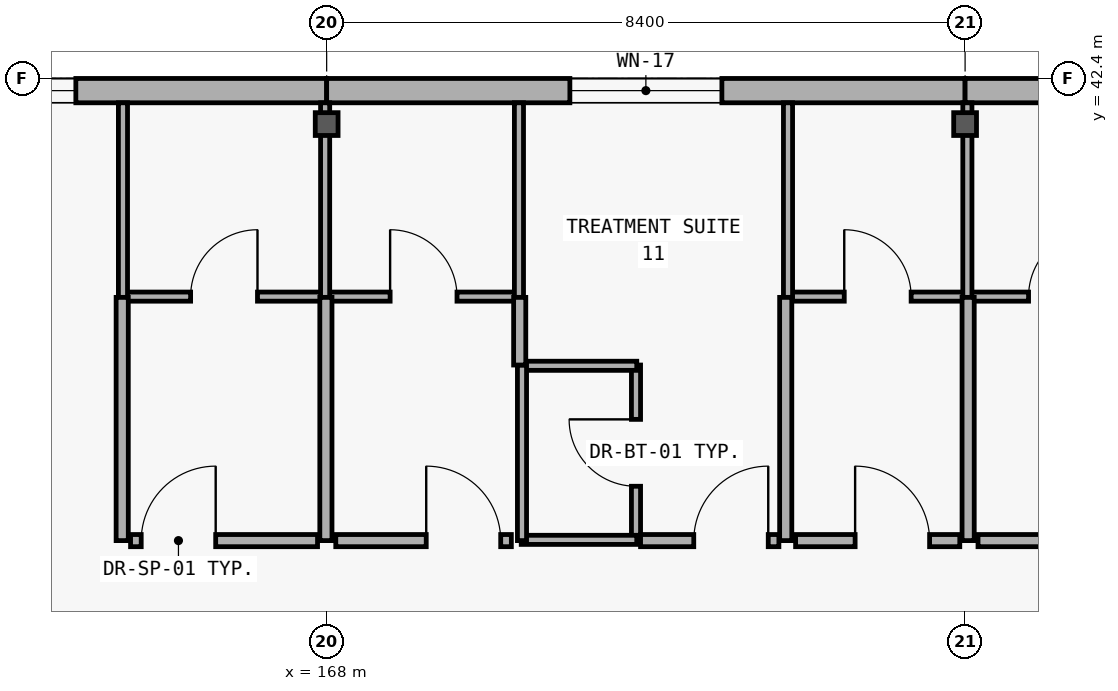
"""IFC4 building model, lengths in metres.
Left out: names, types, materials, properties, quantities, classifications, styles, units other than length and angle.
Written with IfcOpenShell. Run it as: python <this file> out.ifc"""

import sys

from ifc_helpers import new_model, si_unit, direction, frame, frame_2d, origin, origin_2d, place, context, subcontext, project, spatial, rectangle, i_section, extrude, element, fill, save


model = new_model("IFC4")
c1 = context("Model", 3, precision=1e-05, world=origin(), true_north=direction((0.0, 1.0)))
c2 = subcontext(c1, "Body", "Model", "MODEL_VIEW")
j1 = project(units=[si_unit("LENGTHUNIT", "METRE"), si_unit("PLANEANGLEUNIT", "RADIAN")], contexts=[c1])
p1 = place(None, origin())
s1 = spatial("IfcSite", under=j1, at=p1, CompositionType="ELEMENT")
p2 = place(p1, origin())
s2 = spatial("IfcBuilding", under=s1, at=p2, CompositionType="ELEMENT")
p3 = place(p2, frame((0.0, 0.0, 5.4)))
s3 = spatial("IfcBuildingStorey", under=s2, at=p3, CompositionType="ELEMENT", Elevation=5.4)
for number, where, z_axis, x_axis in (
    (1, (168.0, 41.8, 0.0), (0.0, 0.0, 1.0), (1.0, 0.0, 0.0)),
    (2, (176.4, 41.8, 0.0), (0.0, 0.0, 1.0), (1.0, 0.0, 0.0)),
):
    element("IfcColumn", number, at=place(p3, frame(where, z_axis=z_axis, x_axis=x_axis)), inside=s3, PredefinedType="COLUMN", context=c2, shape_type="SweptSolid", body=[
        extrude(i_section(OverallWidth=0.3, OverallDepth=0.3, WebThickness=0.011, FlangeThickness=0.019, at=origin_2d()), origin(), (0.0, 0.0, 1.0), 5.4),
    ])
p4 = place(p3, frame((159.6, 42.24, 0.0), z_axis=(0.0, 0.0, 1.0), x_axis=(1.0, 0.0, 0.0)))
e3 = element("IfcWall", 3, at=p4, inside=s3, PredefinedType="SOLIDWALL", context=c2, shape_type="SweptSolid", body=[
    extrude(rectangle(XDim=8.4, YDim=0.32, at=frame_2d((4.2, 0.0))), origin(), (0.0, 0.0, 1.0), 5.1),
])
p5 = place(p4, frame((3.3, 0.0, 0.9)))
e4 = element("IfcOpeningElement", 4, at=p5, cuts=e3, PredefinedType="OPENING", context=c2, shape_type="SweptSolid", body=[
    extrude(rectangle(XDim=1.8, YDim=1.6, at=frame_2d((0.9, 0.8))), frame((0.0, 0.17, 0.0), z_axis=(0.0, -1.0, 0.0), x_axis=(1.0, 0.0, 0.0)), (0.0, 0.0, 1.0), 0.34),
])
p6 = place(p3, frame((168.0, 42.24, 0.0), z_axis=(0.0, 0.0, 1.0), x_axis=(1.0, 0.0, 0.0)))
e5 = element("IfcWall", 5, at=p6, inside=s3, PredefinedType="SOLIDWALL", context=c2, shape_type="SweptSolid", body=[
    extrude(rectangle(XDim=8.4, YDim=0.32, at=frame_2d((4.2, 0.0))), origin(), (0.0, 0.0, 1.0), 5.1),
])
p7 = place(p6, frame((3.2, 0.0, 0.9)))
e6 = element("IfcOpeningElement", 6, at=p7, cuts=e5, PredefinedType="OPENING", context=c2, shape_type="SweptSolid", body=[
    extrude(rectangle(XDim=2.0, YDim=1.65, at=frame_2d((1.0, 0.825))), frame((0.0, 0.17, 0.0), z_axis=(0.0, -1.0, 0.0), x_axis=(1.0, 0.0, 0.0)), (0.0, 0.0, 1.0), 0.34),
])
p8 = place(p3, frame((176.4, 42.24, 0.0), z_axis=(0.0, 0.0, 1.0), x_axis=(1.0, 0.0, 0.0)))
e7 = element("IfcWall", 7, at=p8, inside=s3, PredefinedType="SOLIDWALL", context=c2, shape_type="SweptSolid", body=[
    extrude(rectangle(XDim=8.4, YDim=0.32, at=frame_2d((4.2, 0.0))), origin(), (0.0, 0.0, 1.0), 5.1),
])
p9 = place(p8, frame((3.1, 0.0, 0.9)))
e8 = element("IfcOpeningElement", 8, at=p9, cuts=e7, PredefinedType="OPENING", context=c2, shape_type="SweptSolid", body=[
    extrude(rectangle(XDim=2.2, YDim=1.65, at=frame_2d((1.1, 0.825))), frame((0.0, 0.17, 0.0), z_axis=(0.0, -1.0, 0.0), x_axis=(1.0, 0.0, 0.0)), (0.0, 0.0, 1.0), 0.34),
])
p10 = place(p3, frame((165.31, 39.53, 0.0), z_axis=(0.0, 0.0, 1.0), x_axis=(1.0, 0.0, 0.0)))
e9 = element("IfcWall", 9, at=p10, inside=s3, PredefinedType="PARTITIONING", context=c2, shape_type="SweptSolid", body=[
    extrude(rectangle(XDim=2.68, YDim=0.12, at=frame_2d((1.34, 0.0))), origin(), (0.0, 0.0, 1.0), 4.18),
])
p11 = place(p10, frame((0.9, 0.0, 0.0)))
e10 = element("IfcOpeningElement", 10, at=p11, cuts=e9, PredefinedType="OPENING", context=c2, shape_type="SweptSolid", body=[
    extrude(rectangle(XDim=0.88, YDim=2.15, at=frame_2d((0.44, 1.075))), frame((0.0, 0.07, 0.0), z_axis=(0.0, -1.0, 0.0), x_axis=(1.0, 0.0, 0.0)), (0.0, 0.0, 1.0), 0.14),
])
p12 = place(p3, frame((168.01, 39.53, 0.0), z_axis=(0.0, 0.0, 1.0), x_axis=(1.0, 0.0, 0.0)))
e11 = element("IfcWall", 11, at=p12, inside=s3, PredefinedType="PARTITIONING", context=c2, shape_type="SweptSolid", body=[
    extrude(rectangle(XDim=2.53, YDim=0.12, at=frame_2d((1.265, 0.0))), origin(), (0.0, 0.0, 1.0), 4.18),
])
p13 = place(p12, frame((0.825, 0.0, 0.0)))
e12 = element("IfcOpeningElement", 12, at=p13, cuts=e11, PredefinedType="OPENING", context=c2, shape_type="SweptSolid", body=[
    extrude(rectangle(XDim=0.88, YDim=2.15, at=frame_2d((0.44, 1.075))), frame((0.0, 0.07, 0.0), z_axis=(0.0, -1.0, 0.0), x_axis=(1.0, 0.0, 0.0)), (0.0, 0.0, 1.0), 0.14),
])
p14 = place(p3, frame((172.07, 36.32, 0.0), z_axis=(0.0, 0.0, 1.0), x_axis=(0.0, 1.0, 0.0)))
e13 = element("IfcWall", 13, at=p14, inside=s3, PredefinedType="PARTITIONING", context=c2, shape_type="SweptSolid", body=[
    extrude(rectangle(XDim=2.31, YDim=0.12, at=frame_2d((1.155, 0.0))), origin(), (0.0, 0.0, 1.0), 4.18),
])
p15 = place(p14, frame((0.715, 0.0, 0.0)))
e14 = element("IfcOpeningElement", 14, at=p15, cuts=e13, PredefinedType="OPENING", context=c2, shape_type="SweptSolid", body=[
    extrude(rectangle(XDim=0.88, YDim=2.15, at=frame_2d((0.44, 1.075))), frame((0.0, 0.07, 0.0), z_axis=(0.0, -1.0, 0.0), x_axis=(1.0, 0.0, 0.0)), (0.0, 0.0, 1.0), 0.14),
])
p16 = place(p3, frame((174.06, 39.53, 0.0), z_axis=(0.0, 0.0, 1.0), x_axis=(1.0, 0.0, 0.0)))
e15 = element("IfcWall", 15, at=p16, inside=s3, PredefinedType="PARTITIONING", context=c2, shape_type="SweptSolid", body=[
    extrude(rectangle(XDim=2.38, YDim=0.12, at=frame_2d((1.19, 0.0))), origin(), (0.0, 0.0, 1.0), 4.18),
])
p17 = place(p16, frame((0.75, 0.0, 0.0)))
e16 = element("IfcOpeningElement", 16, at=p17, cuts=e15, PredefinedType="OPENING", context=c2, shape_type="SweptSolid", body=[
    extrude(rectangle(XDim=0.88, YDim=2.15, at=frame_2d((0.44, 1.075))), frame((0.0, 0.07, 0.0), z_axis=(0.0, -1.0, 0.0), x_axis=(1.0, 0.0, 0.0)), (0.0, 0.0, 1.0), 0.14),
])
p18 = place(p3, frame((176.46, 39.53, 0.0), z_axis=(0.0, 0.0, 1.0), x_axis=(1.0, 0.0, 0.0)))
e17 = element("IfcWall", 17, at=p18, inside=s3, PredefinedType="PARTITIONING", context=c2, shape_type="SweptSolid", body=[
    extrude(rectangle(XDim=2.43, YDim=0.12, at=frame_2d((1.215, 0.0))), origin(), (0.0, 0.0, 1.0), 4.18),
])
p19 = place(p18, frame((0.775, 0.0, 0.0)))
e18 = element("IfcOpeningElement", 18, at=p19, cuts=e17, PredefinedType="OPENING", context=c2, shape_type="SweptSolid", body=[
    extrude(rectangle(XDim=0.88, YDim=2.15, at=frame_2d((0.44, 1.075))), frame((0.0, 0.07, 0.0), z_axis=(0.0, -1.0, 0.0), x_axis=(1.0, 0.0, 0.0)), (0.0, 0.0, 1.0), 0.14),
])
p20 = place(p3, frame((165.42, 36.32, 0.0), z_axis=(0.0, 0.0, 1.0), x_axis=(1.0, 0.0, 0.0)))
e19 = element("IfcWall", 19, at=p20, inside=s3, PredefinedType="PARTITIONING", context=c2, shape_type="SweptSolid", body=[
    extrude(rectangle(XDim=2.46, YDim=0.16, at=frame_2d((1.23, 0.0))), origin(), (0.0, 0.0, 1.0), 4.18),
])
p21 = place(p20, frame((0.14, 0.0, 0.0)))
e20 = element("IfcOpeningElement", 20, at=p21, cuts=e19, PredefinedType="OPENING", context=c2, shape_type="SweptSolid", body=[
    extrude(rectangle(XDim=0.98, YDim=2.2, at=frame_2d((0.49, 1.1))), frame((0.0, 0.09, 0.0), z_axis=(0.0, -1.0, 0.0), x_axis=(1.0, 0.0, 0.0)), (0.0, 0.0, 1.0), 0.18),
])
p22 = place(p3, frame((168.12, 36.32, 0.0), z_axis=(0.0, 0.0, 1.0), x_axis=(1.0, 0.0, 0.0)))
e21 = element("IfcWall", 21, at=p22, inside=s3, PredefinedType="PARTITIONING", context=c2, shape_type="SweptSolid", body=[
    extrude(rectangle(XDim=2.31, YDim=0.16, at=frame_2d((1.155, 0.0))), origin(), (0.0, 0.0, 1.0), 4.18),
])
p23 = place(p22, frame((1.19, 0.0, 0.0)))
e22 = element("IfcOpeningElement", 22, at=p23, cuts=e21, PredefinedType="OPENING", context=c2, shape_type="SweptSolid", body=[
    extrude(rectangle(XDim=0.98, YDim=2.2, at=frame_2d((0.49, 1.1))), frame((0.0, 0.09, 0.0), z_axis=(0.0, -1.0, 0.0), x_axis=(1.0, 0.0, 0.0)), (0.0, 0.0, 1.0), 0.18),
])
p24 = place(p3, frame((172.13, 36.32, 0.0), z_axis=(0.0, 0.0, 1.0), x_axis=(1.0, 0.0, 0.0)))
e23 = element("IfcWall", 23, at=p24, inside=s3, PredefinedType="PARTITIONING", context=c2, shape_type="SweptSolid", body=[
    extrude(rectangle(XDim=1.82, YDim=0.16, at=frame_2d((0.91, 0.0))), origin(), (0.0, 0.0, 1.0), 4.18),
])
p25 = place(p24, frame((0.7, 0.0, 0.0)))
e24 = element("IfcOpeningElement", 24, at=p25, cuts=e23, PredefinedType="OPENING", context=c2, shape_type="SweptSolid", body=[
    extrude(rectangle(XDim=0.98, YDim=2.2, at=frame_2d((0.49, 1.1))), frame((0.0, 0.09, 0.0), z_axis=(0.0, -1.0, 0.0), x_axis=(1.0, 0.0, 0.0)), (0.0, 0.0, 1.0), 0.18),
])
p26 = place(p3, frame((174.17, 36.32, 0.0), z_axis=(0.0, 0.0, 1.0), x_axis=(1.0, 0.0, 0.0)))
e25 = element("IfcWall", 25, at=p26, inside=s3, PredefinedType="PARTITIONING", context=c2, shape_type="SweptSolid", body=[
    extrude(rectangle(XDim=2.16, YDim=0.16, at=frame_2d((1.08, 0.0))), origin(), (0.0, 0.0, 1.0), 4.18),
])
p27 = place(p26, frame((0.783, 0.0, 0.0)))
e26 = element("IfcOpeningElement", 26, at=p27, cuts=e25, PredefinedType="OPENING", context=c2, shape_type="SweptSolid", body=[
    extrude(rectangle(XDim=0.98, YDim=2.2, at=frame_2d((0.49, 1.1))), frame((0.0, 0.09, 0.0), z_axis=(0.0, -1.0, 0.0), x_axis=(1.0, 0.0, 0.0)), (0.0, 0.0, 1.0), 0.18),
])
p28 = place(p3, frame((176.57, 36.32, 0.0), z_axis=(0.0, 0.0, 1.0), x_axis=(1.0, 0.0, 0.0)))
e27 = element("IfcWall", 27, at=p28, inside=s3, PredefinedType="PARTITIONING", context=c2, shape_type="SweptSolid", body=[
    extrude(rectangle(XDim=2.21, YDim=0.16, at=frame_2d((1.105, 0.0))), origin(), (0.0, 0.0, 1.0), 4.18),
])
p29 = place(p28, frame((1.09, 0.0, 0.0)))
e28 = element("IfcOpeningElement", 28, at=p29, cuts=e27, PredefinedType="OPENING", context=c2, shape_type="SweptSolid", body=[
    extrude(rectangle(XDim=0.98, YDim=2.2, at=frame_2d((0.49, 1.1))), frame((0.0, 0.09, 0.0), z_axis=(0.0, -1.0, 0.0), x_axis=(1.0, 0.0, 0.0)), (0.0, 0.0, 1.0), 0.18),
])
for number, where, z_axis, x_axis in (
    (29, (165.32, 39.52, 0.0), (0.0, 0.0, 1.0), (0.0, 1.0, 0.0)),
    (30, (167.98, 39.52, 0.0), (0.0, 0.0, 1.0), (0.0, 1.0, 0.0)),
    (31, (170.53, 39.52, 0.0), (0.0, 0.0, 1.0), (0.0, 1.0, 0.0)),
):
    element("IfcWall", number, at=place(p3, frame(where, z_axis=z_axis, x_axis=x_axis)), inside=s3, PredefinedType="PARTITIONING", context=c2, shape_type="SweptSolid", body=[
        extrude(rectangle(XDim=2.56, YDim=0.12, at=frame_2d((1.28, 0.0))), origin(), (0.0, 0.0, 1.0), 4.18),
    ])
for number, where, z_axis, x_axis in (
    (32, (170.56, 36.33, 0.0), (0.0, 0.0, 1.0), (1.0, 0.0, 0.0)),
    (33, (170.56, 38.62, 0.0), (0.0, 0.0, 1.0), (1.0, 0.0, 0.0)),
):
    element("IfcWall", number, at=place(p3, frame(where, z_axis=z_axis, x_axis=x_axis)), inside=s3, PredefinedType="PARTITIONING", context=c2, shape_type="SweptSolid", body=[
        extrude(rectangle(XDim=1.52, YDim=0.12, at=frame_2d((0.76, 0.0))), origin(), (0.0, 0.0, 1.0), 4.18),
    ])
p30 = place(p3, frame((170.57, 36.32, 0.0), z_axis=(0.0, 0.0, 1.0), x_axis=(0.0, 1.0, 0.0)))
e34 = element("IfcWall", 34, at=p30, inside=s3, PredefinedType="PARTITIONING", context=c2, shape_type="SweptSolid", body=[
    extrude(rectangle(XDim=2.31, YDim=0.12, at=frame_2d((1.155, 0.0))), origin(), (0.0, 0.0, 1.0), 4.18),
])
for number, where, z_axis, x_axis in (
    (35, (174.07, 39.52, 0.0), (0.0, 0.0, 1.0), (0.0, 1.0, 0.0)),
    (36, (176.43, 39.52, 0.0), (0.0, 0.0, 1.0), (0.0, 1.0, 0.0)),
):
    element("IfcWall", number, at=place(p3, frame(where, z_axis=z_axis, x_axis=x_axis)), inside=s3, PredefinedType="PARTITIONING", context=c2, shape_type="SweptSolid", body=[
        extrude(rectangle(XDim=2.56, YDim=0.12, at=frame_2d((1.28, 0.0))), origin(), (0.0, 0.0, 1.0), 4.18),
    ])
for number, where, z_axis, x_axis in (
    (37, (165.31, 36.32, 0.0), (0.0, 0.0, 1.0), (0.0, 1.0, 0.0)),
    (38, (167.99, 36.32, 0.0), (0.0, 0.0, 1.0), (0.0, 1.0, 0.0)),
):
    element("IfcWall", number, at=place(p3, frame(where, z_axis=z_axis, x_axis=x_axis)), inside=s3, PredefinedType="PARTITIONING", context=c2, shape_type="SweptSolid", body=[
        extrude(rectangle(XDim=3.2, YDim=0.16, at=frame_2d((1.6, 0.0))), origin(), (0.0, 0.0, 1.0), 4.18),
    ])
p31 = place(p3, frame((170.54, 38.63, 0.0), z_axis=(0.0, 0.0, 1.0), x_axis=(0.0, 1.0, 0.0)))
e39 = element("IfcWall", 39, at=p31, inside=s3, PredefinedType="PARTITIONING", context=c2, shape_type="SweptSolid", body=[
    extrude(rectangle(XDim=0.89, YDim=0.16, at=frame_2d((0.445, 0.0))), origin(), (0.0, 0.0, 1.0), 4.18),
])
for number, where, z_axis, x_axis in (
    (40, (174.04, 36.32, 0.0), (0.0, 0.0, 1.0), (0.0, 1.0, 0.0)),
    (41, (176.44, 36.32, 0.0), (0.0, 0.0, 1.0), (0.0, 1.0, 0.0)),
):
    element("IfcWall", number, at=place(p3, frame(where, z_axis=z_axis, x_axis=x_axis)), inside=s3, PredefinedType="PARTITIONING", context=c2, shape_type="SweptSolid", body=[
        extrude(rectangle(XDim=3.2, YDim=0.16, at=frame_2d((1.6, 0.0))), origin(), (0.0, 0.0, 1.0), 4.18),
    ])
p32 = place(p5, origin())
e42 = element("IfcWindow", 42, at=p32, inside=s3, PartitioningType="SINGLE_PANEL", PredefinedType="WINDOW", context=c2, shape_type="SweptSolid", body=[
    extrude(rectangle(XDim=1.8, YDim=1.6, at=frame_2d((0.9, 0.8))), frame((0.0, 0.03, 0.0), z_axis=(0.0, -1.0, 0.0), x_axis=(1.0, 0.0, 0.0)), (0.0, 0.0, 1.0), 0.06),
])
fill(e4, e42)
p33 = place(p7, origin())
e43 = element("IfcWindow", 43, at=p33, inside=s3, PartitioningType="SINGLE_PANEL", PredefinedType="WINDOW", context=c2, shape_type="SweptSolid", body=[
    extrude(rectangle(XDim=2.0, YDim=1.65, at=frame_2d((1.0, 0.825))), frame((0.0, 0.03, 0.0), z_axis=(0.0, -1.0, 0.0), x_axis=(1.0, 0.0, 0.0)), (0.0, 0.0, 1.0), 0.06),
])
fill(e6, e43)
p34 = place(p11, origin())
e44 = element("IfcDoor", 44, at=p34, inside=s3, OperationType="SINGLE_SWING_RIGHT", PredefinedType="DOOR", context=c2, shape_type="SweptSolid", body=[
    extrude(rectangle(XDim=0.88, YDim=2.15, at=frame_2d((0.44, 1.075))), frame((0.0, 0.025, 0.0), z_axis=(0.0, -1.0, 0.0), x_axis=(1.0, 0.0, 0.0)), (0.0, 0.0, 1.0), 0.05),
])
fill(e10, e44)
p35 = place(p13, origin())
e45 = element("IfcDoor", 45, at=p35, inside=s3, OperationType="SINGLE_SWING_LEFT", PredefinedType="DOOR", context=c2, shape_type="SweptSolid", body=[
    extrude(rectangle(XDim=0.88, YDim=2.15, at=frame_2d((0.44, 1.075))), frame((0.0, 0.025, 0.0), z_axis=(0.0, -1.0, 0.0), x_axis=(1.0, 0.0, 0.0)), (0.0, 0.0, 1.0), 0.05),
])
fill(e12, e45)
p36 = place(p15, origin())
e46 = element("IfcDoor", 46, at=p36, inside=s3, OperationType="SINGLE_SWING_RIGHT", PredefinedType="DOOR", context=c2, shape_type="SweptSolid", body=[
    extrude(rectangle(XDim=0.88, YDim=2.15, at=frame_2d((0.44, 1.075))), frame((0.0, 0.025, 0.0), z_axis=(0.0, -1.0, 0.0), x_axis=(1.0, 0.0, 0.0)), (0.0, 0.0, 1.0), 0.05),
])
fill(e14, e46)
p37 = place(p17, origin())
e47 = element("IfcDoor", 47, at=p37, inside=s3, OperationType="SINGLE_SWING_LEFT", PredefinedType="DOOR", context=c2, shape_type="SweptSolid", body=[
    extrude(rectangle(XDim=0.88, YDim=2.15, at=frame_2d((0.44, 1.075))), frame((0.0, 0.025, 0.0), z_axis=(0.0, -1.0, 0.0), x_axis=(1.0, 0.0, 0.0)), (0.0, 0.0, 1.0), 0.05),
])
fill(e16, e47)
p38 = place(p19, origin())
e48 = element("IfcDoor", 48, at=p38, inside=s3, OperationType="SINGLE_SWING_RIGHT", PredefinedType="DOOR", context=c2, shape_type="SweptSolid", body=[
    extrude(rectangle(XDim=0.88, YDim=2.15, at=frame_2d((0.44, 1.075))), frame((0.0, 0.025, 0.0), z_axis=(0.0, -1.0, 0.0), x_axis=(1.0, 0.0, 0.0)), (0.0, 0.0, 1.0), 0.05),
])
fill(e18, e48)
p39 = place(p21, origin())
e49 = element("IfcDoor", 49, at=p39, inside=s3, OperationType="SINGLE_SWING_RIGHT", PredefinedType="DOOR", context=c2, shape_type="SweptSolid", body=[
    extrude(rectangle(XDim=0.98, YDim=2.2, at=frame_2d((0.49, 1.1))), frame((0.0, 0.025, 0.0), z_axis=(0.0, -1.0, 0.0), x_axis=(1.0, 0.0, 0.0)), (0.0, 0.0, 1.0), 0.05),
])
fill(e20, e49)
p40 = place(p23, origin())
e50 = element("IfcDoor", 50, at=p40, inside=s3, OperationType="SINGLE_SWING_LEFT", PredefinedType="DOOR", context=c2, shape_type="SweptSolid", body=[
    extrude(rectangle(XDim=0.98, YDim=2.2, at=frame_2d((0.49, 1.1))), frame((0.0, 0.025, 0.0), z_axis=(0.0, -1.0, 0.0), x_axis=(1.0, 0.0, 0.0)), (0.0, 0.0, 1.0), 0.05),
])
fill(e22, e50)
p41 = place(p25, origin())
e51 = element("IfcDoor", 51, at=p41, inside=s3, OperationType="SINGLE_SWING_RIGHT", PredefinedType="DOOR", context=c2, shape_type="SweptSolid", body=[
    extrude(rectangle(XDim=0.98, YDim=2.2, at=frame_2d((0.49, 1.1))), frame((0.0, 0.025, 0.0), z_axis=(0.0, -1.0, 0.0), x_axis=(1.0, 0.0, 0.0)), (0.0, 0.0, 1.0), 0.05),
])
fill(e24, e51)
p42 = place(p27, origin())
e52 = element("IfcDoor", 52, at=p42, inside=s3, OperationType="SINGLE_SWING_LEFT", PredefinedType="DOOR", context=c2, shape_type="SweptSolid", body=[
    extrude(rectangle(XDim=0.98, YDim=2.2, at=frame_2d((0.49, 1.1))), frame((0.0, 0.025, 0.0), z_axis=(0.0, -1.0, 0.0), x_axis=(1.0, 0.0, 0.0)), (0.0, 0.0, 1.0), 0.05),
])
fill(e26, e52)
save(model, sys.argv[1])
